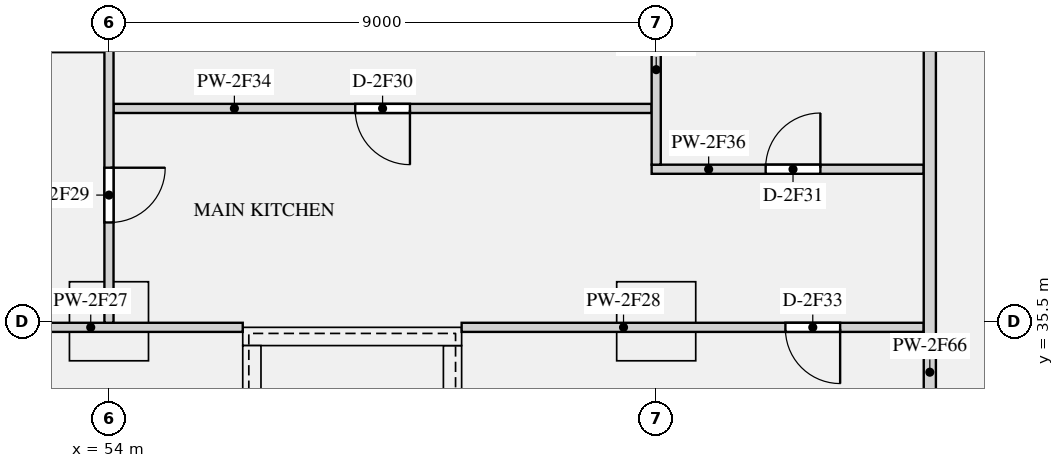
"""IFC4 building model, lengths in metres.
Left out: names, types, materials, properties, quantities, classifications, styles, units other than length and angle.
Written with IfcOpenShell. Run it as: python <this file> out.ifc"""

import sys

from ifc_helpers import new_model, si_unit, direction, frame, frame_2d, origin, origin_2d, place, context, subcontext, project, spatial, rectangle, extrude, element, fill, save


model = new_model("IFC4")
c1 = context("Model", 3, precision=1e-05, world=origin(), true_north=direction((0.0, 1.0)))
c2 = subcontext(c1, "Body", "Model", "MODEL_VIEW")
j1 = project(units=[si_unit("LENGTHUNIT", "METRE"), si_unit("PLANEANGLEUNIT", "RADIAN")], contexts=[c1])
p1 = place(None, origin())
s1 = spatial("IfcSite", under=j1, at=p1, CompositionType="ELEMENT")
p2 = place(p1, origin())
s2 = spatial("IfcBuilding", under=s1, at=p2, CompositionType="ELEMENT")
p3 = place(p2, frame((0.0, 0.0, 124.5)))
s3 = spatial("IfcBuildingStorey", under=s2, at=p3, CompositionType="ELEMENT", Elevation=124.5)
for number, where, z_axis, x_axis in (
    (1, (54.0, 35.5, 0.0), (0.0, 0.0, 1.0), (1.0, 0.0, 0.0)),
    (2, (63.0, 35.5, 0.0), (0.0, 0.0, 1.0), (1.0, 0.0, 0.0)),
):
    element("IfcColumn", number, at=place(p3, frame(where, z_axis=z_axis, x_axis=x_axis)), inside=s3, PredefinedType="COLUMN", context=c2, shape_type="SweptSolid", body=[
        extrude(rectangle(XDim=1.3, YDim=1.3, at=origin_2d()), origin(), (0.0, 0.0, 1.0), 3.15),
    ])
p4 = place(p3, frame((56.2, 35.25, 0.0), z_axis=(0.0, 0.0, 1.0), x_axis=(1.0, 0.0, 0.0)))
e3 = element("IfcWall", 3, at=p4, inside=s3, PredefinedType="SHEAR", context=c2, shape_type="SweptSolid", body=[
    extrude(rectangle(XDim=3.6, YDim=0.3, at=frame_2d((1.8, 0.0))), origin(), (0.0, 0.0, 1.0), 3.15),
])
for number, where, z_axis, x_axis in (
    (4, (56.35, 27.3, 0.0), (0.0, 0.0, 1.0), (0.0, 1.0, 0.0)),
    (5, (59.65, 27.3, 0.0), (0.0, 0.0, 1.0), (0.0, 1.0, 0.0)),
):
    element("IfcWall", number, at=place(p3, frame(where, z_axis=z_axis, x_axis=x_axis)), inside=s3, PredefinedType="SHEAR", context=c2, shape_type="SweptSolid", body=[
        extrude(rectangle(XDim=7.8, YDim=0.3, at=frame_2d((3.9, 0.0))), origin(), (0.0, 0.0, 1.0), 3.15),
    ])
p5 = place(p3, frame((48.1, 35.4, 0.0), z_axis=(0.0, 0.0, 1.0), x_axis=(1.0, 0.0, 0.0)))
e6 = element("IfcWall", 6, at=p5, inside=s3, PredefinedType="PARTITIONING", context=c2, shape_type="SweptSolid", body=[
    extrude(rectangle(XDim=8.1, YDim=0.15, at=frame_2d((4.05, 0.0))), origin(), (0.0, 0.0, 1.0), 2.83),
])
p6 = place(p5, frame((2.2, 0.0, 0.0)))
e7 = element("IfcOpeningElement", 7, at=p6, cuts=e6, PredefinedType="OPENING", context=c2, shape_type="SweptSolid", body=[
    extrude(rectangle(XDim=0.9, YDim=2.1, at=frame_2d((0.45, 1.05))), frame((0.0, 0.085, 0.0), z_axis=(0.0, -1.0, 0.0), x_axis=(1.0, 0.0, 0.0)), (0.0, 0.0, 1.0), 0.17),
])
p7 = place(p3, frame((59.8, 35.4, 0.0), z_axis=(0.0, 0.0, 1.0), x_axis=(1.0, 0.0, 0.0)))
e8 = element("IfcWall", 8, at=p7, inside=s3, PredefinedType="PARTITIONING", context=c2, shape_type="SweptSolid", body=[
    extrude(rectangle(XDim=7.6, YDim=0.15, at=frame_2d((3.8, 0.0))), origin(), (0.0, 0.0, 1.0), 2.83),
])
p8 = place(p7, frame((5.325, 0.0, 0.0)))
e9 = element("IfcOpeningElement", 9, at=p8, cuts=e8, PredefinedType="OPENING", context=c2, shape_type="SweptSolid", body=[
    extrude(rectangle(XDim=0.9, YDim=2.1, at=frame_2d((0.45, 1.05))), frame((0.0, 0.085, 0.0), z_axis=(0.0, -1.0, 0.0), x_axis=(1.0, 0.0, 0.0)), (0.0, 0.0, 1.0), 0.17),
])
p9 = place(p3, frame((54.075, 39.0, 0.0), z_axis=(0.0, 0.0, 1.0), x_axis=(1.0, 0.0, 0.0)))
e10 = element("IfcWall", 10, at=p9, inside=s3, PredefinedType="PARTITIONING", context=c2, shape_type="SweptSolid", body=[
    extrude(rectangle(XDim=8.85, YDim=0.15, at=frame_2d((4.425, 0.0))), origin(), (0.0, 0.0, 1.0), 2.83),
])
p10 = place(p9, frame((3.975, 0.0, 0.0)))
e11 = element("IfcOpeningElement", 11, at=p10, cuts=e10, PredefinedType="OPENING", context=c2, shape_type="SweptSolid", body=[
    extrude(rectangle(XDim=0.9, YDim=2.1, at=frame_2d((0.45, 1.05))), frame((0.0, 0.085, 0.0), z_axis=(0.0, -1.0, 0.0), x_axis=(1.0, 0.0, 0.0)), (0.0, 0.0, 1.0), 0.17),
])
p11 = place(p3, frame((62.925, 38.0, 0.0), z_axis=(0.0, 0.0, 1.0), x_axis=(1.0, 0.0, 0.0)))
e12 = element("IfcWall", 12, at=p11, inside=s3, PredefinedType="PARTITIONING", context=c2, shape_type="SweptSolid", body=[
    extrude(rectangle(XDim=4.475, YDim=0.15, at=frame_2d((2.237, 0.0))), origin(), (0.0, 0.0, 1.0), 2.83),
])
p12 = place(p11, frame((1.875, 0.0, 0.0)))
e13 = element("IfcOpeningElement", 13, at=p12, cuts=e12, PredefinedType="OPENING", context=c2, shape_type="SweptSolid", body=[
    extrude(rectangle(XDim=0.9, YDim=2.1, at=frame_2d((0.45, 1.05))), frame((0.0, 0.085, 0.0), z_axis=(0.0, -1.0, 0.0), x_axis=(1.0, 0.0, 0.0)), (0.0, 0.0, 1.0), 0.17),
])
p13 = place(p3, frame((54.0, 35.475, 0.0), z_axis=(0.0, 0.0, 1.0), x_axis=(0.0, 1.0, 0.0)))
e14 = element("IfcWall", 14, at=p13, inside=s3, PredefinedType="PARTITIONING", context=c2, shape_type="SweptSolid", body=[
    extrude(rectangle(XDim=9.275, YDim=0.15, at=frame_2d((4.637, 0.0))), origin(), (0.0, 0.0, 1.0), 2.83),
])
p14 = place(p13, frame((1.65, 0.0, 0.0)))
e15 = element("IfcOpeningElement", 15, at=p14, cuts=e14, PredefinedType="OPENING", context=c2, shape_type="SweptSolid", body=[
    extrude(rectangle(XDim=0.9, YDim=2.1, at=frame_2d((0.45, 1.05))), frame((0.0, 0.085, 0.0), z_axis=(0.0, -1.0, 0.0), x_axis=(1.0, 0.0, 0.0)), (0.0, 0.0, 1.0), 0.17),
])
p15 = place(p3, frame((63.0, 38.075, 0.0), z_axis=(0.0, 0.0, 1.0), x_axis=(0.0, 1.0, 0.0)))
e16 = element("IfcWall", 16, at=p15, inside=s3, PredefinedType="PARTITIONING", context=c2, shape_type="SweptSolid", body=[
    extrude(rectangle(XDim=6.675, YDim=0.15, at=frame_2d((3.337, 0.0))), origin(), (0.0, 0.0, 1.0), 2.83),
])
p16 = place(p15, frame((3.125, 0.0, 0.0)))
e17 = element("IfcOpeningElement", 17, at=p16, cuts=e16, PredefinedType="OPENING", context=c2, shape_type="SweptSolid", body=[
    extrude(rectangle(XDim=1.5, YDim=2.1, at=frame_2d((0.75, 1.05))), frame((0.0, 0.085, 0.0), z_axis=(0.0, -1.0, 0.0), x_axis=(1.0, 0.0, 0.0)), (0.0, 0.0, 1.0), 0.17),
])
p17 = place(p3, frame((67.5, 24.575, 0.0), z_axis=(0.0, 0.0, 1.0), x_axis=(0.0, 1.0, 0.0)))
e18 = element("IfcWall", 18, at=p17, inside=s3, PredefinedType="PARTITIONING", context=c2, shape_type="SweptSolid", body=[
    extrude(rectangle(XDim=20.175, YDim=0.2, at=frame_2d((10.087, 0.0))), origin(), (0.0, 0.0, 1.0), 2.83),
])
p18 = place(p14, frame((0.9, 0.0, 0.0), z_axis=(0.0, 0.0, 1.0), x_axis=(-1.0, 0.0, 0.0)))
e19 = element("IfcDoor", 19, at=p18, inside=s3, OperationType="SINGLE_SWING_LEFT", PredefinedType="DOOR", context=c2, shape_type="SweptSolid", body=[
    extrude(rectangle(XDim=0.9, YDim=2.1, at=frame_2d((0.45, 1.05))), frame((0.0, 0.025, 0.0), z_axis=(0.0, -1.0, 0.0), x_axis=(1.0, 0.0, 0.0)), (0.0, 0.0, 1.0), 0.05),
])
fill(e15, e19)
p19 = place(p10, frame((0.9, 0.0, 0.0), z_axis=(0.0, 0.0, 1.0), x_axis=(-1.0, 0.0, 0.0)))
e20 = element("IfcDoor", 20, at=p19, inside=s3, OperationType="SINGLE_SWING_LEFT", PredefinedType="DOOR", context=c2, shape_type="SweptSolid", body=[
    extrude(rectangle(XDim=0.9, YDim=2.1, at=frame_2d((0.45, 1.05))), frame((0.0, 0.025, 0.0), z_axis=(0.0, -1.0, 0.0), x_axis=(1.0, 0.0, 0.0)), (0.0, 0.0, 1.0), 0.05),
])
fill(e11, e20)
p20 = place(p12, origin())
e21 = element("IfcDoor", 21, at=p20, inside=s3, OperationType="SINGLE_SWING_RIGHT", PredefinedType="DOOR", context=c2, shape_type="SweptSolid", body=[
    extrude(rectangle(XDim=0.9, YDim=2.1, at=frame_2d((0.45, 1.05))), frame((0.0, 0.025, 0.0), z_axis=(0.0, -1.0, 0.0), x_axis=(1.0, 0.0, 0.0)), (0.0, 0.0, 1.0), 0.05),
])
fill(e13, e21)
p21 = place(p8, frame((0.9, 0.0, 0.0), z_axis=(0.0, 0.0, 1.0), x_axis=(-1.0, 0.0, 0.0)))
e22 = element("IfcDoor", 22, at=p21, inside=s3, OperationType="SINGLE_SWING_LEFT", PredefinedType="DOOR", context=c2, shape_type="SweptSolid", body=[
    extrude(rectangle(XDim=0.9, YDim=2.1, at=frame_2d((0.45, 1.05))), frame((0.0, 0.025, 0.0), z_axis=(0.0, -1.0, 0.0), x_axis=(1.0, 0.0, 0.0)), (0.0, 0.0, 1.0), 0.05),
])
fill(e9, e22)
save(model, sys.argv[1])
